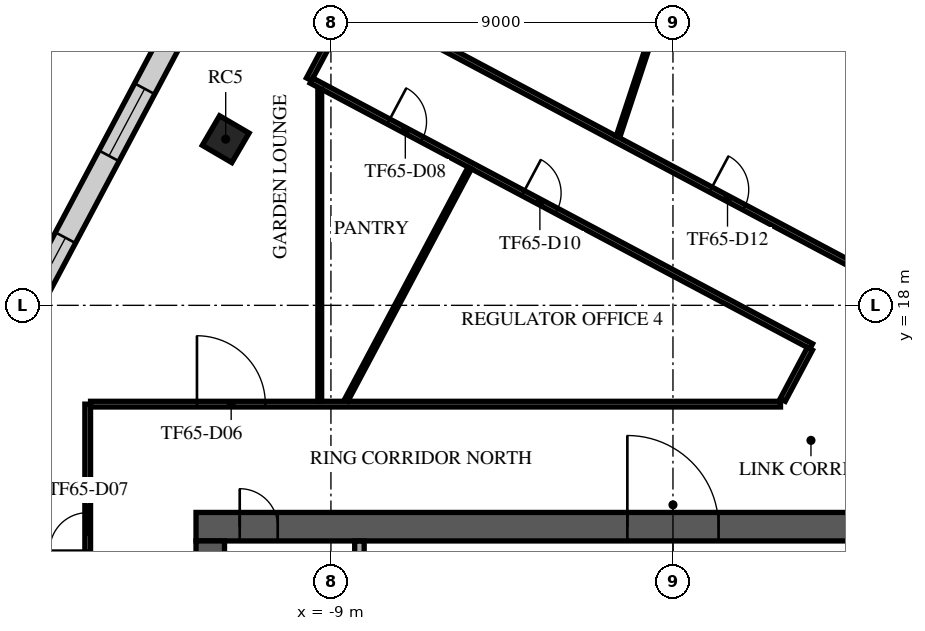
"""IFC4 building model, lengths in metres.
Left out: names, types, materials, properties, quantities, classifications, styles, units other than length and angle.
Written with IfcOpenShell. Run it as: python <this file> out.ifc"""

import sys

from ifc_helpers import new_model, si_unit, direction, frame, frame_2d, origin, origin_2d, place, context, subcontext, project, spatial, rectangle, extrude, element, fill, save


model = new_model("IFC4")
c1 = context("Model", 3, precision=1e-05, world=origin(), true_north=direction((0.0, 1.0)))
c2 = subcontext(c1, "Body", "Model", "MODEL_VIEW")
j1 = project(units=[si_unit("LENGTHUNIT", "METRE"), si_unit("PLANEANGLEUNIT", "RADIAN")], contexts=[c1])
p1 = place(None, origin())
s1 = spatial("IfcSite", under=j1, at=p1, CompositionType="ELEMENT")
p2 = place(p1, origin())
s2 = spatial("IfcBuilding", under=s1, at=p2, CompositionType="ELEMENT")
p3 = place(p2, frame((0.0, 0.0, 274.9)))
s3 = spatial("IfcBuildingStorey", under=s2, at=p3, CompositionType="ELEMENT", Elevation=274.9)
p4 = place(p3, frame((-11.769, 22.372, 0.0), z_axis=(0.0, 0.0, 1.0), x_axis=(0.504643651291, 0.863327739165, 0.0)))
e1 = element("IfcColumn", 1, at=p4, inside=s3, PredefinedType="COLUMN", context=c2, shape_type="SweptSolid", body=[
    extrude(rectangle(XDim=0.9, YDim=0.9, at=origin_2d()), origin(), (0.0, 0.0, 1.0), 4.0),
])
p5 = place(p3, frame((-12.55, 12.175, 0.0), z_axis=(0.0, 0.0, 1.0), x_axis=(1.0, 0.0, 0.0)))
e2 = element("IfcWall", 2, at=p5, inside=s3, PredefinedType="SHEAR", context=c2, shape_type="SweptSolid", body=[
    extrude(rectangle(XDim=25.1, YDim=0.75, at=frame_2d((12.55, 0.0))), origin(), (0.0, 0.0, 1.0), 3.64),
])
p6 = place(p5, frame((11.35, 0.0, 0.0)))
e3 = element("IfcOpeningElement", 3, at=p6, cuts=e2, PredefinedType="OPENING", context=c2, shape_type="SweptSolid", body=[
    extrude(rectangle(XDim=2.4, YDim=2.4, at=frame_2d((1.2, 1.2))), frame((0.0, 0.385, 0.0), z_axis=(0.0, -1.0, 0.0), x_axis=(1.0, 0.0, 0.0)), (0.0, 0.0, 1.0), 0.77),
])
p7 = place(p5, frame((22.175, 0.0, 0.0)))
e4 = element("IfcOpeningElement", 4, at=p7, cuts=e2, PredefinedType="OPENING", context=c2, shape_type="SweptSolid", body=[
    extrude(rectangle(XDim=1.2, YDim=2.1, at=frame_2d((0.6, 1.05))), frame((0.0, 0.385, 0.0), z_axis=(0.0, -1.0, 0.0), x_axis=(1.0, 0.0, 0.0)), (0.0, 0.0, 1.0), 0.77),
])
p8 = place(p5, frame((1.15, 0.0, 0.0)))
e5 = element("IfcOpeningElement", 5, at=p8, cuts=e2, PredefinedType="OPENING", context=c2, shape_type="SweptSolid", body=[
    extrude(rectangle(XDim=1.0, YDim=2.1, at=frame_2d((0.5, 1.05))), frame((0.0, 0.385, 0.0), z_axis=(0.0, -1.0, 0.0), x_axis=(1.0, 0.0, 0.0)), (0.0, 0.0, 1.0), 0.77),
])
p9 = place(p3, frame((-12.175, -11.8, 0.0), z_axis=(0.0, 0.0, 1.0), x_axis=(0.0, 1.0, 0.0)))
e6 = element("IfcWall", 6, at=p9, inside=s3, PredefinedType="SHEAR", context=c2, shape_type="SweptSolid", body=[
    extrude(rectangle(XDim=23.6, YDim=0.75, at=frame_2d((11.8, 0.0))), origin(), (0.0, 0.0, 1.0), 3.64),
])
p10 = place(p9, frame((10.6, 0.0, 0.0)))
e7 = element("IfcOpeningElement", 7, at=p10, cuts=e6, PredefinedType="OPENING", context=c2, shape_type="SweptSolid", body=[
    extrude(rectangle(XDim=2.4, YDim=2.4, at=frame_2d((1.2, 1.2))), frame((0.0, 0.385, 0.0), z_axis=(0.0, -1.0, 0.0), x_axis=(1.0, 0.0, 0.0)), (0.0, 0.0, 1.0), 0.77),
])
p11 = place(p3, frame((-8.25, 8.805, 0.0), z_axis=(0.0, 0.0, 1.0), x_axis=(0.0, 1.0, 0.0)))
e8 = element("IfcWall", 8, at=p11, inside=s3, PredefinedType="PARTITIONING", context=c2, shape_type="SweptSolid", body=[
    extrude(rectangle(XDim=2.99, YDim=0.25, at=frame_2d((1.495, 0.0))), origin(), (0.0, 0.0, 1.0), 3.64),
])
p12 = place(p11, frame((0.895, 0.0, 0.0)))
e9 = element("IfcOpeningElement", 9, at=p12, cuts=e8, PredefinedType="OPENING", context=c2, shape_type="SweptSolid", body=[
    extrude(rectangle(XDim=1.0, YDim=2.1, at=frame_2d((0.5, 1.05))), frame((0.0, 0.135, 0.0), z_axis=(0.0, -1.0, 0.0), x_axis=(1.0, 0.0, 0.0)), (0.0, 0.0, 1.0), 0.27),
])
p13 = place(p3, frame((-9.159, 32.618, 0.0), z_axis=(0.0, 0.0, 1.0), x_axis=(-0.469470468388, -0.88294817476, 0.0)))
e10 = element("IfcWall", 10, at=p13, inside=s3, PredefinedType="STANDARD", context=c2, shape_type="SweptSolid", body=[
    extrude(rectangle(XDim=48.843, YDim=0.6, at=frame_2d((24.422, 0.0))), origin(), (0.0, 0.0, 1.0), 3.64),
])
p14 = place(p13, frame((1.22, 0.0, 0.9)))
e11 = element("IfcOpeningElement", 11, at=p14, cuts=e10, PredefinedType="OPENING", context=c2, shape_type="SweptSolid", body=[
    extrude(rectangle(XDim=2.0, YDim=2.1, at=frame_2d((1.0, 1.05))), frame((0.0, 0.31, 0.0), z_axis=(0.0, -1.0, 0.0), x_axis=(1.0, 0.0, 0.0)), (0.0, 0.0, 1.0), 0.62),
])
p15 = place(p13, frame((5.66, 0.0, 0.9)))
e12 = element("IfcOpeningElement", 12, at=p15, cuts=e10, PredefinedType="OPENING", context=c2, shape_type="SweptSolid", body=[
    extrude(rectangle(XDim=2.0, YDim=2.1, at=frame_2d((1.0, 1.05))), frame((0.0, 0.31, 0.0), z_axis=(0.0, -1.0, 0.0), x_axis=(1.0, 0.0, 0.0)), (0.0, 0.0, 1.0), 0.62),
])
p16 = place(p13, frame((10.101, 0.0, 0.9)))
e13 = element("IfcOpeningElement", 13, at=p16, cuts=e10, PredefinedType="OPENING", context=c2, shape_type="SweptSolid", body=[
    extrude(rectangle(XDim=2.0, YDim=2.1, at=frame_2d((1.0, 1.05))), frame((0.0, 0.31, 0.0), z_axis=(0.0, -1.0, 0.0), x_axis=(1.0, 0.0, 0.0)), (0.0, 0.0, 1.0), 0.62),
])
p17 = place(p13, frame((14.541, 0.0, 0.9)))
e14 = element("IfcOpeningElement", 14, at=p17, cuts=e10, PredefinedType="OPENING", context=c2, shape_type="SweptSolid", body=[
    extrude(rectangle(XDim=2.0, YDim=2.1, at=frame_2d((1.0, 1.05))), frame((0.0, 0.31, 0.0), z_axis=(0.0, -1.0, 0.0), x_axis=(1.0, 0.0, 0.0)), (0.0, 0.0, 1.0), 0.62),
])
p18 = place(p13, frame((18.981, 0.0, 0.9)))
e15 = element("IfcOpeningElement", 15, at=p18, cuts=e10, PredefinedType="OPENING", context=c2, shape_type="SweptSolid", body=[
    extrude(rectangle(XDim=2.0, YDim=2.1, at=frame_2d((1.0, 1.05))), frame((0.0, 0.31, 0.0), z_axis=(0.0, -1.0, 0.0), x_axis=(1.0, 0.0, 0.0)), (0.0, 0.0, 1.0), 0.62),
])
p19 = place(p13, frame((23.422, 0.0, 0.9)))
e16 = element("IfcOpeningElement", 16, at=p19, cuts=e10, PredefinedType="OPENING", context=c2, shape_type="SweptSolid", body=[
    extrude(rectangle(XDim=2.0, YDim=2.1, at=frame_2d((1.0, 1.05))), frame((0.0, 0.31, 0.0), z_axis=(0.0, -1.0, 0.0), x_axis=(1.0, 0.0, 0.0)), (0.0, 0.0, 1.0), 0.62),
])
p20 = place(p13, frame((27.862, 0.0, 0.9)))
e17 = element("IfcOpeningElement", 17, at=p20, cuts=e10, PredefinedType="OPENING", context=c2, shape_type="SweptSolid", body=[
    extrude(rectangle(XDim=2.0, YDim=2.1, at=frame_2d((1.0, 1.05))), frame((0.0, 0.31, 0.0), z_axis=(0.0, -1.0, 0.0), x_axis=(1.0, 0.0, 0.0)), (0.0, 0.0, 1.0), 0.62),
])
p21 = place(p13, frame((32.302, 0.0, 0.9)))
e18 = element("IfcOpeningElement", 18, at=p21, cuts=e10, PredefinedType="OPENING", context=c2, shape_type="SweptSolid", body=[
    extrude(rectangle(XDim=2.0, YDim=2.1, at=frame_2d((1.0, 1.05))), frame((0.0, 0.31, 0.0), z_axis=(0.0, -1.0, 0.0), x_axis=(1.0, 0.0, 0.0)), (0.0, 0.0, 1.0), 0.62),
])
p22 = place(p13, frame((36.742, 0.0, 0.9)))
e19 = element("IfcOpeningElement", 19, at=p22, cuts=e10, PredefinedType="OPENING", context=c2, shape_type="SweptSolid", body=[
    extrude(rectangle(XDim=2.0, YDim=2.1, at=frame_2d((1.0, 1.05))), frame((0.0, 0.31, 0.0), z_axis=(0.0, -1.0, 0.0), x_axis=(1.0, 0.0, 0.0)), (0.0, 0.0, 1.0), 0.62),
])
p23 = place(p13, frame((41.183, 0.0, 0.9)))
e20 = element("IfcOpeningElement", 20, at=p23, cuts=e10, PredefinedType="OPENING", context=c2, shape_type="SweptSolid", body=[
    extrude(rectangle(XDim=2.0, YDim=2.1, at=frame_2d((1.0, 1.05))), frame((0.0, 0.31, 0.0), z_axis=(0.0, -1.0, 0.0), x_axis=(1.0, 0.0, 0.0)), (0.0, 0.0, 1.0), 0.62),
])
p24 = place(p13, frame((45.623, 0.0, 0.9)))
e21 = element("IfcOpeningElement", 21, at=p24, cuts=e10, PredefinedType="OPENING", context=c2, shape_type="SweptSolid", body=[
    extrude(rectangle(XDim=2.0, YDim=2.1, at=frame_2d((1.0, 1.05))), frame((0.0, 0.31, 0.0), z_axis=(0.0, -1.0, 0.0), x_axis=(1.0, 0.0, 0.0)), (0.0, 0.0, 1.0), 0.62),
])
p25 = place(p3, frame((29.875, 17.753, 0.0), z_axis=(0.0, 0.0, 1.0), x_axis=(-0.88294707281, 0.469472540854, 0.0)))
e22 = element("IfcWall", 22, at=p25, inside=s3, PredefinedType="STANDARD", context=c2, shape_type="SweptSolid", body=[
    extrude(rectangle(XDim=36.243, YDim=0.6, at=frame_2d((18.122, 0.0))), origin(), (0.0, 0.0, 1.0), 3.64),
])
p26 = place(p25, frame((1.215, 0.0, 0.9)))
e23 = element("IfcOpeningElement", 23, at=p26, cuts=e22, PredefinedType="OPENING", context=c2, shape_type="SweptSolid", body=[
    extrude(rectangle(XDim=2.1, YDim=2.1, at=frame_2d((1.05, 1.05))), frame((0.0, 0.31, 0.0), z_axis=(0.0, -1.0, 0.0), x_axis=(1.0, 0.0, 0.0)), (0.0, 0.0, 1.0), 0.62),
])
p27 = place(p25, frame((5.746, 0.0, 0.9)))
e24 = element("IfcOpeningElement", 24, at=p27, cuts=e22, PredefinedType="OPENING", context=c2, shape_type="SweptSolid", body=[
    extrude(rectangle(XDim=2.1, YDim=2.1, at=frame_2d((1.05, 1.05))), frame((0.0, 0.31, 0.0), z_axis=(0.0, -1.0, 0.0), x_axis=(1.0, 0.0, 0.0)), (0.0, 0.0, 1.0), 0.62),
])
p28 = place(p25, frame((10.276, 0.0, 0.9)))
e25 = element("IfcOpeningElement", 25, at=p28, cuts=e22, PredefinedType="OPENING", context=c2, shape_type="SweptSolid", body=[
    extrude(rectangle(XDim=2.1, YDim=2.1, at=frame_2d((1.05, 1.05))), frame((0.0, 0.31, 0.0), z_axis=(0.0, -1.0, 0.0), x_axis=(1.0, 0.0, 0.0)), (0.0, 0.0, 1.0), 0.62),
])
p29 = place(p25, frame((14.806, 0.0, 0.9)))
e26 = element("IfcOpeningElement", 26, at=p29, cuts=e22, PredefinedType="OPENING", context=c2, shape_type="SweptSolid", body=[
    extrude(rectangle(XDim=2.1, YDim=2.1, at=frame_2d((1.05, 1.05))), frame((0.0, 0.31, 0.0), z_axis=(0.0, -1.0, 0.0), x_axis=(1.0, 0.0, 0.0)), (0.0, 0.0, 1.0), 0.62),
])
p30 = place(p25, frame((19.337, 0.0, 0.9)))
e27 = element("IfcOpeningElement", 27, at=p30, cuts=e22, PredefinedType="OPENING", context=c2, shape_type="SweptSolid", body=[
    extrude(rectangle(XDim=2.1, YDim=2.1, at=frame_2d((1.05, 1.05))), frame((0.0, 0.31, 0.0), z_axis=(0.0, -1.0, 0.0), x_axis=(1.0, 0.0, 0.0)), (0.0, 0.0, 1.0), 0.62),
])
p31 = place(p25, frame((23.867, 0.0, 0.9)))
e28 = element("IfcOpeningElement", 28, at=p31, cuts=e22, PredefinedType="OPENING", context=c2, shape_type="SweptSolid", body=[
    extrude(rectangle(XDim=2.1, YDim=2.1, at=frame_2d((1.05, 1.05))), frame((0.0, 0.31, 0.0), z_axis=(0.0, -1.0, 0.0), x_axis=(1.0, 0.0, 0.0)), (0.0, 0.0, 1.0), 0.62),
])
p32 = place(p25, frame((28.398, 0.0, 0.9)))
e29 = element("IfcOpeningElement", 29, at=p32, cuts=e22, PredefinedType="OPENING", context=c2, shape_type="SweptSolid", body=[
    extrude(rectangle(XDim=2.1, YDim=2.1, at=frame_2d((1.05, 1.05))), frame((0.0, 0.31, 0.0), z_axis=(0.0, -1.0, 0.0), x_axis=(1.0, 0.0, 0.0)), (0.0, 0.0, 1.0), 0.62),
])
p33 = place(p25, frame((32.928, 0.0, 0.9)))
e30 = element("IfcOpeningElement", 30, at=p33, cuts=e22, PredefinedType="OPENING", context=c2, shape_type="SweptSolid", body=[
    extrude(rectangle(XDim=2.1, YDim=2.1, at=frame_2d((1.05, 1.05))), frame((0.0, 0.31, 0.0), z_axis=(0.0, -1.0, 0.0), x_axis=(1.0, 0.0, 0.0)), (0.0, 0.0, 1.0), 0.62),
])
p34 = place(p3, frame((-15.4, -10.543, 0.0), z_axis=(0.0, 0.0, 1.0), x_axis=(0.0, 1.0, 0.0)))
e31 = element("IfcWall", 31, at=p34, inside=s3, PredefinedType="PARTITIONING", context=c2, shape_type="SweptSolid", body=[
    extrude(rectangle(XDim=25.943, YDim=0.15, at=frame_2d((12.972, 0.0))), origin(), (0.0, 0.0, 1.0), 3.24),
])
p35 = place(p34, frame((7.55, 0.0, 0.0)))
e32 = element("IfcOpeningElement", 32, at=p35, cuts=e31, PredefinedType="OPENING", context=c2, shape_type="SweptSolid", body=[
    extrude(rectangle(XDim=1.8, YDim=2.1, at=frame_2d((0.9, 1.05))), frame((0.0, 0.085, 0.0), z_axis=(0.0, -1.0, 0.0), x_axis=(1.0, 0.0, 0.0)), (0.0, 0.0, 1.0), 0.17),
])
p36 = place(p34, frame((13.164, 0.0, 0.0)))
e33 = element("IfcOpeningElement", 33, at=p36, cuts=e31, PredefinedType="OPENING", context=c2, shape_type="SweptSolid", body=[
    extrude(rectangle(XDim=1.0, YDim=2.1, at=frame_2d((0.5, 1.05))), frame((0.0, 0.085, 0.0), z_axis=(0.0, -1.0, 0.0), x_axis=(1.0, 0.0, 0.0)), (0.0, 0.0, 1.0), 0.17),
])
p37 = place(p34, frame((22.088, 0.0, 0.0)))
e34 = element("IfcOpeningElement", 34, at=p37, cuts=e31, PredefinedType="OPENING", context=c2, shape_type="SweptSolid", body=[
    extrude(rectangle(XDim=1.0, YDim=2.1, at=frame_2d((0.5, 1.05))), frame((0.0, 0.085, 0.0), z_axis=(0.0, -1.0, 0.0), x_axis=(1.0, 0.0, 0.0)), (0.0, 0.0, 1.0), 0.17),
])
p38 = place(p3, frame((-15.325, 15.4, 0.0), z_axis=(0.0, 0.0, 1.0), x_axis=(1.0, 0.0, 0.0)))
e35 = element("IfcWall", 35, at=p38, inside=s3, PredefinedType="PARTITIONING", context=c2, shape_type="SweptSolid", body=[
    extrude(rectangle(XDim=18.155, YDim=0.15, at=frame_2d((9.078, 0.0))), origin(), (0.0, 0.0, 1.0), 3.24),
])
p39 = place(p38, frame((2.8, 0.0, 0.0)))
e36 = element("IfcOpeningElement", 36, at=p39, cuts=e35, PredefinedType="OPENING", context=c2, shape_type="SweptSolid", body=[
    extrude(rectangle(XDim=1.8, YDim=2.1, at=frame_2d((0.9, 1.05))), frame((0.0, 0.085, 0.0), z_axis=(0.0, -1.0, 0.0), x_axis=(1.0, 0.0, 0.0)), (0.0, 0.0, 1.0), 0.17),
])
p40 = place(p3, frame((-9.578, 23.949, 0.0), z_axis=(0.0, 0.0, 1.0), x_axis=(0.469531998299, 0.882915456073, 0.0)))
e37 = element("IfcWall", 37, at=p40, inside=s3, PredefinedType="PARTITIONING", context=c2, shape_type="SweptSolid", body=[
    extrude(rectangle(XDim=2.4, YDim=0.15, at=frame_2d((1.2, 0.0))), origin(), (0.0, 0.0, 1.0), 3.64),
])
p41 = place(p3, frame((-9.512, 23.914, 0.0), z_axis=(0.0, 0.0, 1.0), x_axis=(0.882964773335, -0.469439249583, 0.0)))
e38 = element("IfcWall", 38, at=p41, inside=s3, PredefinedType="PARTITIONING", context=c2, shape_type="SweptSolid", body=[
    extrude(rectangle(XDim=14.894, YDim=0.15, at=frame_2d((7.447, 0.0))), origin(), (0.0, 0.0, 1.0), 3.04),
])
p42 = place(p41, frame((2.296, 0.0, 0.0)))
e39 = element("IfcOpeningElement", 39, at=p42, cuts=e38, PredefinedType="OPENING", context=c2, shape_type="SweptSolid", body=[
    extrude(rectangle(XDim=1.0, YDim=2.1, at=frame_2d((0.5, 1.05))), frame((0.0, 0.085, 0.0), z_axis=(0.0, -1.0, 0.0), x_axis=(1.0, 0.0, 0.0)), (0.0, 0.0, 1.0), 0.17),
])
p43 = place(p41, frame((6.307, 0.0, 0.0)))
e40 = element("IfcOpeningElement", 40, at=p43, cuts=e38, PredefinedType="OPENING", context=c2, shape_type="SweptSolid", body=[
    extrude(rectangle(XDim=1.0, YDim=2.1, at=frame_2d((0.5, 1.05))), frame((0.0, 0.085, 0.0), z_axis=(0.0, -1.0, 0.0), x_axis=(1.0, 0.0, 0.0)), (0.0, 0.0, 1.0), 0.17),
])
p44 = place(p3, frame((-8.385, 26.033, 0.0), z_axis=(0.0, 0.0, 1.0), x_axis=(0.882949433839, -0.46946810039, 0.0)))
e41 = element("IfcWall", 41, at=p44, inside=s3, PredefinedType="PARTITIONING", context=c2, shape_type="SweptSolid", body=[
    extrude(rectangle(XDim=39.325, YDim=0.15, at=frame_2d((19.662, 0.0))), origin(), (0.0, 0.0, 1.0), 3.04),
])
p45 = place(p44, frame((10.622, 0.0, 0.0)))
e42 = element("IfcOpeningElement", 42, at=p45, cuts=e41, PredefinedType="OPENING", context=c2, shape_type="SweptSolid", body=[
    extrude(rectangle(XDim=1.0, YDim=2.1, at=frame_2d((0.5, 1.05))), frame((0.0, 0.085, 0.0), z_axis=(0.0, -1.0, 0.0), x_axis=(1.0, 0.0, 0.0)), (0.0, 0.0, 1.0), 0.17),
])
p46 = place(p44, frame((16.615, 0.0, 0.0)))
e43 = element("IfcOpeningElement", 43, at=p46, cuts=e41, PredefinedType="OPENING", context=c2, shape_type="SweptSolid", body=[
    extrude(rectangle(XDim=1.0, YDim=2.1, at=frame_2d((0.5, 1.05))), frame((0.0, 0.085, 0.0), z_axis=(0.0, -1.0, 0.0), x_axis=(1.0, 0.0, 0.0)), (0.0, 0.0, 1.0), 0.17),
])
p47 = place(p44, frame((28.254, 0.0, 0.0)))
e44 = element("IfcOpeningElement", 44, at=p47, cuts=e41, PredefinedType="OPENING", context=c2, shape_type="SweptSolid", body=[
    extrude(rectangle(XDim=1.0, YDim=2.1, at=frame_2d((0.5, 1.05))), frame((0.0, 0.085, 0.0), z_axis=(0.0, -1.0, 0.0), x_axis=(1.0, 0.0, 0.0)), (0.0, 0.0, 1.0), 0.17),
])
p48 = place(p3, frame((2.889, 15.51, 0.0), z_axis=(0.0, 0.0, 1.0), x_axis=(0.469315326783, 0.883030647286, 0.0)))
e45 = element("IfcWall", 45, at=p48, inside=s3, PredefinedType="PARTITIONING", context=c2, shape_type="SweptSolid", body=[
    extrude(rectangle(XDim=1.524, YDim=0.15, at=frame_2d((0.762, 0.0))), origin(), (0.0, 0.0, 1.0), 3.24),
])
p49 = place(p3, frame((-9.294, 15.475, 0.0), z_axis=(0.0, 0.0, 1.0), x_axis=(0.0, 1.0, 0.0)))
e46 = element("IfcWall", 46, at=p49, inside=s3, PredefinedType="PARTITIONING", context=c2, shape_type="SweptSolid", body=[
    extrude(rectangle(XDim=8.211, YDim=0.1, at=frame_2d((4.106, 0.0))), origin(), (0.0, 0.0, 1.0), 3.04),
])
p50 = place(p3, frame((-8.599, 15.499, 0.0), z_axis=(0.0, 0.0, 1.0), x_axis=(0.469406036047, 0.882982430925, 0.0)))
e47 = element("IfcWall", 47, at=p50, inside=s3, PredefinedType="PARTITIONING", context=c2, shape_type="SweptSolid", body=[
    extrude(rectangle(XDim=6.927, YDim=0.1, at=frame_2d((3.463, 0.0))), origin(), (0.0, 0.0, 1.0), 3.24),
])
p51 = place(p3, frame((-1.445, 22.438, 0.0), z_axis=(0.0, 0.0, 1.0), x_axis=(0.313673627087, 0.949530860831, 0.0)))
e48 = element("IfcWall", 48, at=p51, inside=s3, PredefinedType="PARTITIONING", context=c2, shape_type="SweptSolid", body=[
    extrude(rectangle(XDim=10.414, YDim=0.1, at=frame_2d((5.207, 0.0))), origin(), (0.0, 0.0, 1.0), 3.04),
])
p52 = place(p6, origin())
e49 = element("IfcDoor", 49, at=p52, inside=s3, OperationType="SINGLE_SWING_LEFT", PredefinedType="DOOR", context=c2, shape_type="SweptSolid", body=[
    extrude(rectangle(XDim=2.4, YDim=2.4, at=frame_2d((1.2, 1.2))), frame((0.0, 0.025, 0.0), z_axis=(0.0, -1.0, 0.0), x_axis=(1.0, 0.0, 0.0)), (0.0, 0.0, 1.0), 0.05),
])
fill(e3, e49)
p53 = place(p8, origin())
e50 = element("IfcDoor", 50, at=p53, inside=s3, OperationType="SINGLE_SWING_LEFT", PredefinedType="DOOR", context=c2, shape_type="SweptSolid", body=[
    extrude(rectangle(XDim=1.0, YDim=2.1, at=frame_2d((0.5, 1.05))), frame((0.0, 0.025, 0.0), z_axis=(0.0, -1.0, 0.0), x_axis=(1.0, 0.0, 0.0)), (0.0, 0.0, 1.0), 0.05),
])
fill(e5, e50)
p54 = place(p16, origin())
e51 = element("IfcWindow", 51, at=p54, inside=s3, PartitioningType="SINGLE_PANEL", PredefinedType="WINDOW", context=c2, shape_type="SweptSolid", body=[
    extrude(rectangle(XDim=2.0, YDim=2.1, at=frame_2d((1.0, 1.05))), frame((0.0, 0.03, 0.0), z_axis=(0.0, -1.0, 0.0), x_axis=(1.0, 0.0, 0.0)), (0.0, 0.0, 1.0), 0.06),
])
fill(e13, e51)
p55 = place(p17, origin())
e52 = element("IfcWindow", 52, at=p55, inside=s3, PartitioningType="SINGLE_PANEL", PredefinedType="WINDOW", context=c2, shape_type="SweptSolid", body=[
    extrude(rectangle(XDim=2.0, YDim=2.1, at=frame_2d((1.0, 1.05))), frame((0.0, 0.03, 0.0), z_axis=(0.0, -1.0, 0.0), x_axis=(1.0, 0.0, 0.0)), (0.0, 0.0, 1.0), 0.06),
])
fill(e14, e52)
p56 = place(p39, origin())
e53 = element("IfcDoor", 53, at=p56, inside=s3, OperationType="DOUBLE_DOOR_SINGLE_SWING", PredefinedType="DOOR", context=c2, shape_type="SweptSolid", body=[
    extrude(rectangle(XDim=1.8, YDim=2.1, at=frame_2d((0.9, 1.05))), frame((0.0, 0.025, 0.0), z_axis=(0.0, -1.0, 0.0), x_axis=(1.0, 0.0, 0.0)), (0.0, 0.0, 1.0), 0.05),
])
fill(e36, e53)
p57 = place(p37, origin())
e54 = element("IfcDoor", 54, at=p57, inside=s3, OperationType="SINGLE_SWING_LEFT", PredefinedType="DOOR", context=c2, shape_type="SweptSolid", body=[
    extrude(rectangle(XDim=1.0, YDim=2.1, at=frame_2d((0.5, 1.05))), frame((0.0, 0.025, 0.0), z_axis=(0.0, -1.0, 0.0), x_axis=(1.0, 0.0, 0.0)), (0.0, 0.0, 1.0), 0.05),
])
fill(e34, e54)
p58 = place(p42, frame((1.0, 0.0, 0.0), z_axis=(0.0, 0.0, 1.0), x_axis=(-1.0, 0.0, 0.0)))
e55 = element("IfcDoor", 55, at=p58, inside=s3, OperationType="SINGLE_SWING_RIGHT", PredefinedType="DOOR", context=c2, shape_type="SweptSolid", body=[
    extrude(rectangle(XDim=1.0, YDim=2.1, at=frame_2d((0.5, 1.05))), frame((0.0, 0.025, 0.0), z_axis=(0.0, -1.0, 0.0), x_axis=(1.0, 0.0, 0.0)), (0.0, 0.0, 1.0), 0.05),
])
fill(e39, e55)
p59 = place(p43, frame((1.0, 0.0, 0.0), z_axis=(0.0, 0.0, 1.0), x_axis=(-1.0, 0.0, 0.0)))
e56 = element("IfcDoor", 56, at=p59, inside=s3, OperationType="SINGLE_SWING_LEFT", PredefinedType="DOOR", context=c2, shape_type="SweptSolid", body=[
    extrude(rectangle(XDim=1.0, YDim=2.1, at=frame_2d((0.5, 1.05))), frame((0.0, 0.025, 0.0), z_axis=(0.0, -1.0, 0.0), x_axis=(1.0, 0.0, 0.0)), (0.0, 0.0, 1.0), 0.05),
])
fill(e40, e56)
p60 = place(p45, origin())
e57 = element("IfcDoor", 57, at=p60, inside=s3, OperationType="SINGLE_SWING_RIGHT", PredefinedType="DOOR", context=c2, shape_type="SweptSolid", body=[
    extrude(rectangle(XDim=1.0, YDim=2.1, at=frame_2d((0.5, 1.05))), frame((0.0, 0.025, 0.0), z_axis=(0.0, -1.0, 0.0), x_axis=(1.0, 0.0, 0.0)), (0.0, 0.0, 1.0), 0.05),
])
fill(e42, e57)
save(model, sys.argv[1])
